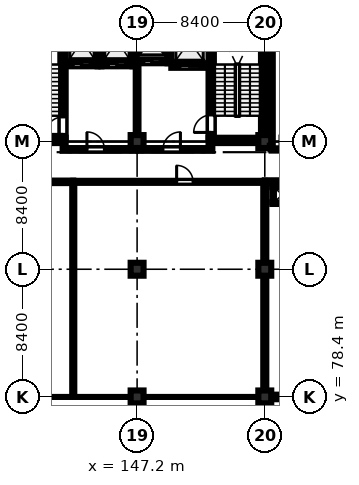
"""IFC4 building model, lengths in metres.
Left out: names, types, materials, properties, quantities, classifications, styles, units other than length and angle.
Written with IfcOpenShell. Run it as: python <this file> out.ifc"""

import sys

from ifc_helpers import new_model, si_unit, direction, frame, frame_2d, origin, origin_2d, place, context, subcontext, project, spatial, rectangle, extrude, element, fill, save


model = new_model("IFC4")
c1 = context("Model", 3, precision=1e-05, world=origin(), true_north=direction((0.0, 1.0)))
c2 = subcontext(c1, "Body", "Model", "MODEL_VIEW")
j1 = project(units=[si_unit("LENGTHUNIT", "METRE"), si_unit("PLANEANGLEUNIT", "RADIAN")], contexts=[c1])
p1 = place(None, origin())
s1 = spatial("IfcSite", under=j1, at=p1, CompositionType="ELEMENT")
p2 = place(p1, origin())
s2 = spatial("IfcBuilding", under=s1, at=p2, CompositionType="ELEMENT")
p3 = place(p2, frame((0.0, 0.0, 27.6)))
s3 = spatial("IfcBuildingStorey", under=s2, at=p3, CompositionType="ELEMENT", Elevation=27.6)
for number, where, z_axis, x_axis in (
    (1, (147.2, 78.4, 0.0), (0.0, 0.0, 1.0), (1.0, 0.0, 0.0)),
    (2, (147.2, 86.8, 0.0), (0.0, 0.0, 1.0), (1.0, 0.0, 0.0)),
    (3, (147.2, 95.2, 0.0), (0.0, 0.0, 1.0), (1.0, 0.0, 0.0)),
    (4, (155.6, 78.4, 0.0), (0.0, 0.0, 1.0), (1.0, 0.0, 0.0)),
    (5, (155.6, 86.8, 0.0), (0.0, 0.0, 1.0), (1.0, 0.0, 0.0)),
    (6, (155.6, 95.2, 0.0), (0.0, 0.0, 1.0), (1.0, 0.0, 0.0)),
):
    element("IfcColumn", number, at=place(p3, frame(where, z_axis=z_axis, x_axis=x_axis)), inside=s3, PredefinedType="COLUMN", context=c2, shape_type="SweptSolid", body=[
        extrude(rectangle(XDim=0.85, YDim=0.85, at=origin_2d()), origin(), (0.0, 0.0, 1.0), 4.02),
    ])
p4 = place(p3, frame((138.7, 95.275, 0.0), z_axis=(0.0, 0.0, 1.0), x_axis=(1.0, 0.0, 0.0)))
e7 = element("IfcWall", 7, at=p4, inside=s3, PredefinedType="SHEAR", context=c2, shape_type="SweptSolid", body=[
    extrude(rectangle(XDim=3.8, YDim=0.35, at=frame_2d((1.9, 0.0))), origin(), (0.0, 0.0, 1.0), 4.02),
])
p5 = place(p3, frame((142.325, 95.45, 0.0), z_axis=(0.0, 0.0, 1.0), x_axis=(0.0, 1.0, 0.0)))
e8 = element("IfcWall", 8, at=p5, inside=s3, PredefinedType="SHEAR", context=c2, shape_type="SweptSolid", body=[
    extrude(rectangle(XDim=7.9, YDim=0.35, at=frame_2d((3.95, 0.0))), origin(), (0.0, 0.0, 1.0), 4.02),
])
p6 = place(p5, frame((0.22, 0.0, 0.0)))
e9 = element("IfcOpeningElement", 9, at=p6, cuts=e8, PredefinedType="OPENING", context=c2, shape_type="SweptSolid", body=[
    extrude(rectangle(XDim=1.15, YDim=2.15, at=frame_2d((0.575, 1.075))), frame((0.0, 0.185, 0.0), z_axis=(0.0, -1.0, 0.0), x_axis=(1.0, 0.0, 0.0)), (0.0, 0.0, 1.0), 0.37),
])
p7 = place(p3, frame((151.9, 95.275, 0.0), z_axis=(0.0, 0.0, 1.0), x_axis=(1.0, 0.0, 0.0)))
e10 = element("IfcWall", 10, at=p7, inside=s3, PredefinedType="SHEAR", context=c2, shape_type="SweptSolid", body=[
    extrude(rectangle(XDim=3.8, YDim=0.35, at=frame_2d((1.9, 0.0))), origin(), (0.0, 0.0, 1.0), 4.02),
])
p8 = place(p3, frame((152.075, 95.45, 0.0), z_axis=(0.0, 0.0, 1.0), x_axis=(0.0, 1.0, 0.0)))
e11 = element("IfcWall", 11, at=p8, inside=s3, PredefinedType="SHEAR", context=c2, shape_type="SweptSolid", body=[
    extrude(rectangle(XDim=7.9, YDim=0.35, at=frame_2d((3.95, 0.0))), origin(), (0.0, 0.0, 1.0), 4.02),
])
p9 = place(p8, frame((0.35, 0.0, 0.0)))
e12 = element("IfcOpeningElement", 12, at=p9, cuts=e11, PredefinedType="OPENING", context=c2, shape_type="SweptSolid", body=[
    extrude(rectangle(XDim=1.15, YDim=2.15, at=frame_2d((0.575, 1.075))), frame((0.0, 0.185, 0.0), z_axis=(0.0, -1.0, 0.0), x_axis=(1.0, 0.0, 0.0)), (0.0, 0.0, 1.0), 0.37),
])
p10 = place(p3, frame((155.525, 95.45, 0.0), z_axis=(0.0, 0.0, 1.0), x_axis=(0.0, 1.0, 0.0)))
e13 = element("IfcWall", 13, at=p10, inside=s3, PredefinedType="SHEAR", context=c2, shape_type="SweptSolid", body=[
    extrude(rectangle(XDim=7.9, YDim=0.35, at=frame_2d((3.95, 0.0))), origin(), (0.0, 0.0, 1.0), 4.02),
])
p11 = place(p3, frame((142.5, 100.275, 0.0), z_axis=(0.0, 0.0, 1.0), x_axis=(1.0, 0.0, 0.0)))
e14 = element("IfcWall", 14, at=p11, inside=s3, PredefinedType="SHEAR", context=c2, shape_type="SweptSolid", body=[
    extrude(rectangle(XDim=2.1, YDim=0.25, at=frame_2d((1.05, 0.0))), origin(), (0.0, 0.0, 1.0), 4.02),
])
p12 = place(p11, frame((0.5, 0.0, 0.0)))
e15 = element("IfcOpeningElement", 15, at=p12, cuts=e14, PredefinedType="OPENING", context=c2, shape_type="SweptSolid", body=[
    extrude(rectangle(XDim=1.1, YDim=2.15, at=frame_2d((0.55, 1.075))), frame((0.0, 0.135, 0.0), z_axis=(0.0, -1.0, 0.0), x_axis=(1.0, 0.0, 0.0)), (0.0, 0.0, 1.0), 0.27),
])
p13 = place(p3, frame((144.725, 100.15, 0.0), z_axis=(0.0, 0.0, 1.0), x_axis=(0.0, 1.0, 0.0)))
e16 = element("IfcWall", 16, at=p13, inside=s3, PredefinedType="SHEAR", context=c2, shape_type="SweptSolid", body=[
    extrude(rectangle(XDim=3.4, YDim=0.25, at=frame_2d((1.7, 0.0))), origin(), (0.0, 0.0, 1.0), 4.02),
])
p14 = place(p3, frame((144.85, 100.275, 0.0), z_axis=(0.0, 0.0, 1.0), x_axis=(1.0, 0.0, 0.0)))
e17 = element("IfcWall", 17, at=p14, inside=s3, PredefinedType="SHEAR", context=c2, shape_type="SweptSolid", body=[
    extrude(rectangle(XDim=2.05, YDim=0.25, at=frame_2d((1.025, 0.0))), origin(), (0.0, 0.0, 1.0), 4.02),
])
p15 = place(p14, frame((0.465, 0.0, 0.0)))
e18 = element("IfcOpeningElement", 18, at=p15, cuts=e17, PredefinedType="OPENING", context=c2, shape_type="SweptSolid", body=[
    extrude(rectangle(XDim=1.12, YDim=2.15, at=frame_2d((0.56, 1.075))), frame((0.0, 0.135, 0.0), z_axis=(0.0, -1.0, 0.0), x_axis=(1.0, 0.0, 0.0)), (0.0, 0.0, 1.0), 0.27),
])
p16 = place(p3, frame((147.025, 100.15, 0.0), z_axis=(0.0, 0.0, 1.0), x_axis=(0.0, 1.0, 0.0)))
e19 = element("IfcWall", 19, at=p16, inside=s3, PredefinedType="SHEAR", context=c2, shape_type="SweptSolid", body=[
    extrude(rectangle(XDim=3.4, YDim=0.25, at=frame_2d((1.7, 0.0))), origin(), (0.0, 0.0, 1.0), 4.02),
])
p17 = place(p3, frame((147.15, 100.475, 0.0), z_axis=(0.0, 0.0, 1.0), x_axis=(1.0, 0.0, 0.0)))
e20 = element("IfcWall", 20, at=p17, inside=s3, PredefinedType="SHEAR", context=c2, shape_type="SweptSolid", body=[
    extrude(rectangle(XDim=2.05, YDim=0.25, at=frame_2d((1.025, 0.0))), origin(), (0.0, 0.0, 1.0), 4.02),
])
p18 = place(p17, frame((0.495, 0.0, 0.0)))
e21 = element("IfcOpeningElement", 21, at=p18, cuts=e20, PredefinedType="OPENING", context=c2, shape_type="SweptSolid", body=[
    extrude(rectangle(XDim=1.06, YDim=2.15, at=frame_2d((0.53, 1.075))), frame((0.0, 0.135, 0.0), z_axis=(0.0, -1.0, 0.0), x_axis=(1.0, 0.0, 0.0)), (0.0, 0.0, 1.0), 0.27),
])
p19 = place(p3, frame((149.325, 100.35, 0.0), z_axis=(0.0, 0.0, 1.0), x_axis=(0.0, 1.0, 0.0)))
e22 = element("IfcWall", 22, at=p19, inside=s3, PredefinedType="SHEAR", context=c2, shape_type="SweptSolid", body=[
    extrude(rectangle(XDim=3.2, YDim=0.25, at=frame_2d((1.6, 0.0))), origin(), (0.0, 0.0, 1.0), 4.02),
])
p20 = place(p3, frame((149.45, 100.175, 0.0), z_axis=(0.0, 0.0, 1.0), x_axis=(1.0, 0.0, 0.0)))
e23 = element("IfcWall", 23, at=p20, inside=s3, PredefinedType="SHEAR", context=c2, shape_type="SweptSolid", body=[
    extrude(rectangle(XDim=2.45, YDim=0.25, at=frame_2d((1.225, 0.0))), origin(), (0.0, 0.0, 1.0), 4.02),
])
p21 = place(p20, frame((0.575, 0.0, 0.0)))
e24 = element("IfcOpeningElement", 24, at=p21, cuts=e23, PredefinedType="OPENING", context=c2, shape_type="SweptSolid", body=[
    extrude(rectangle(XDim=1.3, YDim=2.25, at=frame_2d((0.65, 1.125))), frame((0.0, 0.135, 0.0), z_axis=(0.0, -1.0, 0.0), x_axis=(1.0, 0.0, 0.0)), (0.0, 0.0, 1.0), 0.27),
])
p22 = place(p3, frame((163.025, 78.4, 0.0), z_axis=(0.0, 0.0, 1.0), x_axis=(-1.0, 0.0, 0.0)))
e25 = element("IfcWall", 25, at=p22, inside=s3, PredefinedType="STANDARD", context=c2, shape_type="SweptSolid", body=[
    extrude(rectangle(XDim=7.0, YDim=0.3, at=frame_2d((3.5, 0.0))), origin(), (0.0, 0.0, 1.0), 3.32),
])
p23 = place(p22, frame((1.15, 0.0, 0.95)))
e26 = element("IfcOpeningElement", 26, at=p23, cuts=e25, PredefinedType="OPENING", context=c2, shape_type="SweptSolid", body=[
    extrude(rectangle(XDim=1.85, YDim=2.05, at=frame_2d((0.925, 1.025))), frame((0.0, 0.16, 0.0), z_axis=(0.0, -1.0, 0.0), x_axis=(1.0, 0.0, 0.0)), (0.0, 0.0, 1.0), 0.32),
])
p24 = place(p3, frame((142.3, 94.68, 0.0), z_axis=(0.0, 0.0, 1.0), x_axis=(1.0, 0.0, 0.0)))
e27 = element("IfcWall", 27, at=p24, inside=s3, PredefinedType="STANDARD", context=c2, shape_type="SweptSolid", body=[
    extrude(rectangle(XDim=4.8, YDim=0.18, at=frame_2d((2.4, 0.0))), origin(), (0.0, 0.0, 1.0), 4.02),
])
p25 = place(p24, frame((1.6, 0.0, 0.0)))
e28 = element("IfcOpeningElement", 28, at=p25, cuts=e27, PredefinedType="OPENING", context=c2, shape_type="SweptSolid", body=[
    extrude(rectangle(XDim=1.15, YDim=2.15, at=frame_2d((0.575, 1.075))), frame((0.0, 0.1, 0.0), z_axis=(0.0, -1.0, 0.0), x_axis=(1.0, 0.0, 0.0)), (0.0, 0.0, 1.0), 0.2),
])
p26 = place(p3, frame((147.3, 94.68, 0.0), z_axis=(0.0, 0.0, 1.0), x_axis=(1.0, 0.0, 0.0)))
e29 = element("IfcWall", 29, at=p26, inside=s3, PredefinedType="STANDARD", context=c2, shape_type="SweptSolid", body=[
    extrude(rectangle(XDim=4.85, YDim=0.18, at=frame_2d((2.425, 0.0))), origin(), (0.0, 0.0, 1.0), 4.02),
])
p27 = place(p26, frame((1.6, 0.0, 0.0)))
e30 = element("IfcOpeningElement", 30, at=p27, cuts=e29, PredefinedType="OPENING", context=c2, shape_type="SweptSolid", body=[
    extrude(rectangle(XDim=1.15, YDim=2.15, at=frame_2d((0.575, 1.075))), frame((0.0, 0.1, 0.0), z_axis=(0.0, -1.0, 0.0), x_axis=(1.0, 0.0, 0.0)), (0.0, 0.0, 1.0), 0.2),
])
p28 = place(p3, frame((147.2, 95.75, 0.0), z_axis=(0.0, 0.0, 1.0), x_axis=(0.0, 1.0, 0.0)))
e31 = element("IfcWall", 31, at=p28, inside=s3, PredefinedType="STANDARD", context=c2, shape_type="SweptSolid", body=[
    extrude(rectangle(XDim=4.5, YDim=0.18, at=frame_2d((2.25, 0.0))), origin(), (0.0, 0.0, 1.0), 3.32),
])
p29 = place(p3, frame((156.05, 94.68, 0.0), z_axis=(0.0, 0.0, 1.0), x_axis=(1.0, 0.0, 0.0)))
e32 = element("IfcWall", 32, at=p29, inside=s3, PredefinedType="PARTITIONING", context=c2, shape_type="SweptSolid", body=[
    extrude(rectangle(XDim=7.15, YDim=0.15, at=frame_2d((3.575, 0.0))), origin(), (0.0, 0.0, 1.0), 4.02),
])
p30 = place(p29, frame((0.55, 0.0, 0.0)))
e33 = element("IfcOpeningElement", 33, at=p30, cuts=e32, PredefinedType="OPENING", context=c2, shape_type="SweptSolid", body=[
    extrude(rectangle(XDim=0.98, YDim=2.12, at=frame_2d((0.49, 1.06))), frame((0.0, 0.085, 0.0), z_axis=(0.0, -1.0, 0.0), x_axis=(1.0, 0.0, 0.0)), (0.0, 0.0, 1.0), 0.17),
])
p31 = place(p3, frame((156.05, 94.68, 0.0), z_axis=(0.0, 0.0, 1.0), x_axis=(0.0, 1.0, 0.0)))
e34 = element("IfcWall", 34, at=p31, inside=s3, PredefinedType="PARTITIONING", context=c2, shape_type="SweptSolid", body=[
    extrude(rectangle(XDim=8.57, YDim=0.15, at=frame_2d((4.285, 0.0))), origin(), (0.0, 0.0, 1.0), 4.02),
])
p32 = place(p3, frame((130.55, 92.55, 0.0), z_axis=(0.0, 0.0, 1.0), x_axis=(1.0, 0.0, 0.0)))
e35 = element("IfcWall", 35, at=p32, inside=s3, PredefinedType="PARTITIONING", context=c2, shape_type="SweptSolid", body=[
    extrude(rectangle(XDim=12.45, YDim=0.165, at=frame_2d((6.225, 0.0))), origin(), (0.0, 0.0, 1.0), 4.02),
])
p33 = place(p32, frame((3.65, 0.0, 0.0)))
e36 = element("IfcOpeningElement", 36, at=p33, cuts=e35, PredefinedType="OPENING", context=c2, shape_type="SweptSolid", body=[
    extrude(rectangle(XDim=1.52, YDim=2.22, at=frame_2d((0.76, 1.11))), frame((0.0, 0.093, 0.0), z_axis=(0.0, -1.0, 0.0), x_axis=(1.0, 0.0, 0.0)), (0.0, 0.0, 1.0), 0.185),
])
p34 = place(p3, frame((143.0, 92.55, 0.0), z_axis=(0.0, 0.0, 1.0), x_axis=(1.0, 0.0, 0.0)))
e37 = element("IfcWall", 37, at=p34, inside=s3, PredefinedType="PARTITIONING", context=c2, shape_type="SweptSolid", body=[
    extrude(rectangle(XDim=12.6, YDim=0.135, at=frame_2d((6.3, 0.0))), origin(), (0.0, 0.0, 1.0), 4.02),
])
p35 = place(p34, frame((6.8, 0.0, 0.0)))
e38 = element("IfcOpeningElement", 38, at=p35, cuts=e37, PredefinedType="OPENING", context=c2, shape_type="SweptSolid", body=[
    extrude(rectangle(XDim=1.08, YDim=2.15, at=frame_2d((0.54, 1.075))), frame((0.0, 0.077, 0.0), z_axis=(0.0, -1.0, 0.0), x_axis=(1.0, 0.0, 0.0)), (0.0, 0.0, 1.0), 0.155),
])
p36 = place(p3, frame((143.0, 78.55, 0.0), z_axis=(0.0, 0.0, 1.0), x_axis=(0.0, 1.0, 0.0)))
e39 = element("IfcWall", 39, at=p36, inside=s3, PredefinedType="PARTITIONING", context=c2, shape_type="SweptSolid", body=[
    extrude(rectangle(XDim=14.0, YDim=0.135, at=frame_2d((7.0, 0.0))), origin(), (0.0, 0.0, 1.0), 3.52),
])
p37 = place(p3, frame((155.6, 92.55, 0.0), z_axis=(0.0, 0.0, 1.0), x_axis=(1.0, 0.0, 0.0)))
e40 = element("IfcWall", 40, at=p37, inside=s3, PredefinedType="SOLIDWALL", context=c2, shape_type="SweptSolid", body=[
    extrude(rectangle(XDim=7.75, YDim=0.2, at=frame_2d((3.875, 0.0))), origin(), (0.0, 0.0, 1.0), 4.02),
])
p38 = place(p37, frame((3.4, 0.0, 0.0)))
e41 = element("IfcOpeningElement", 41, at=p38, cuts=e40, PredefinedType="OPENING", context=c2, shape_type="SweptSolid", body=[
    extrude(rectangle(XDim=1.5, YDim=2.2, at=frame_2d((0.75, 1.1))), frame((0.0, 0.11, 0.0), z_axis=(0.0, -1.0, 0.0), x_axis=(1.0, 0.0, 0.0)), (0.0, 0.0, 1.0), 0.22),
])
p39 = place(p3, frame((155.6, 78.55, 0.0), z_axis=(0.0, 0.0, 1.0), x_axis=(0.0, 1.0, 0.0)))
e42 = element("IfcWall", 42, at=p39, inside=s3, PredefinedType="SOLIDWALL", context=c2, shape_type="SweptSolid", body=[
    extrude(rectangle(XDim=14.0, YDim=0.2, at=frame_2d((7.0, 0.0))), origin(), (0.0, 0.0, 1.0), 3.32),
])
for number, where, z_axis, x_axis in (
    (43, (156.095, 91.147, 0.0), (0.0, 0.0, 1.0), (1.0, 0.0, 0.0)),
    (44, (156.095, 92.252, 0.0), (0.0, 0.0, 1.0), (1.0, 0.0, 0.0)),
):
    element("IfcWall", number, at=place(p3, frame(where, z_axis=z_axis, x_axis=x_axis)), inside=s3, PredefinedType="PARTITIONING", context=c2, shape_type="SweptSolid", body=[
        extrude(rectangle(XDim=1.31, YDim=0.105, at=frame_2d((0.655, 0.0))), origin(), (0.0, 0.0, 1.0), 4.02),
    ])
p40 = place(p3, frame((156.147, 91.2, 0.0), z_axis=(0.0, 0.0, 1.0), x_axis=(0.0, 1.0, 0.0)))
e45 = element("IfcWall", 45, at=p40, inside=s3, PredefinedType="PARTITIONING", context=c2, shape_type="SweptSolid", body=[
    extrude(rectangle(XDim=1.0, YDim=0.105, at=frame_2d((0.5, 0.0))), origin(), (0.0, 0.0, 1.0), 4.02),
])
p41 = place(p25, origin())
e46 = element("IfcDoor", 46, at=p41, inside=s3, OperationType="SINGLE_SWING_LEFT", PredefinedType="DOOR", context=c2, shape_type="SweptSolid", body=[
    extrude(rectangle(XDim=1.15, YDim=2.15, at=frame_2d((0.575, 1.075))), frame((0.0, 0.025, 0.0), z_axis=(0.0, -1.0, 0.0), x_axis=(1.0, 0.0, 0.0)), (0.0, 0.0, 1.0), 0.05),
])
fill(e28, e46)
p42 = place(p27, origin())
e47 = element("IfcDoor", 47, at=p42, inside=s3, OperationType="SINGLE_SWING_RIGHT", PredefinedType="DOOR", context=c2, shape_type="SweptSolid", body=[
    extrude(rectangle(XDim=1.15, YDim=2.15, at=frame_2d((0.575, 1.075))), frame((0.0, 0.025, 0.0), z_axis=(0.0, -1.0, 0.0), x_axis=(1.0, 0.0, 0.0)), (0.0, 0.0, 1.0), 0.05),
])
fill(e30, e47)
p43 = place(p35, origin())
e48 = element("IfcDoor", 48, at=p43, inside=s3, OperationType="SINGLE_SWING_LEFT", PredefinedType="DOOR", context=c2, shape_type="SweptSolid", body=[
    extrude(rectangle(XDim=1.08, YDim=2.15, at=frame_2d((0.54, 1.075))), frame((0.0, 0.025, 0.0), z_axis=(0.0, -1.0, 0.0), x_axis=(1.0, 0.0, 0.0)), (0.0, 0.0, 1.0), 0.05),
])
fill(e38, e48)
p44 = place(p6, origin())
e49 = element("IfcDoor", 49, at=p44, inside=s3, OperationType="SINGLE_SWING_LEFT", PredefinedType="DOOR", context=c2, shape_type="SweptSolid", body=[
    extrude(rectangle(XDim=1.15, YDim=2.15, at=frame_2d((0.575, 1.075))), frame((0.0, 0.025, 0.0), z_axis=(0.0, -1.0, 0.0), x_axis=(1.0, 0.0, 0.0)), (0.0, 0.0, 1.0), 0.05),
])
fill(e9, e49)
p45 = place(p9, origin())
e50 = element("IfcDoor", 50, at=p45, inside=s3, OperationType="SINGLE_SWING_LEFT", PredefinedType="DOOR", context=c2, shape_type="SweptSolid", body=[
    extrude(rectangle(XDim=1.15, YDim=2.15, at=frame_2d((0.575, 1.075))), frame((0.0, 0.025, 0.0), z_axis=(0.0, -1.0, 0.0), x_axis=(1.0, 0.0, 0.0)), (0.0, 0.0, 1.0), 0.05),
])
fill(e12, e50)
p46 = place(p12, origin())
e51 = element("IfcDoor", 51, at=p46, inside=s3, OperationType="SLIDING_TO_LEFT", PredefinedType="DOOR", context=c2, shape_type="SweptSolid", body=[
    extrude(rectangle(XDim=1.1, YDim=2.15, at=frame_2d((0.55, 1.075))), frame((0.0, 0.025, 0.0), z_axis=(0.0, -1.0, 0.0), x_axis=(1.0, 0.0, 0.0)), (0.0, 0.0, 1.0), 0.05),
])
fill(e15, e51)
p47 = place(p15, origin())
e52 = element("IfcDoor", 52, at=p47, inside=s3, OperationType="SLIDING_TO_LEFT", PredefinedType="DOOR", context=c2, shape_type="SweptSolid", body=[
    extrude(rectangle(XDim=1.12, YDim=2.15, at=frame_2d((0.56, 1.075))), frame((0.0, 0.025, 0.0), z_axis=(0.0, -1.0, 0.0), x_axis=(1.0, 0.0, 0.0)), (0.0, 0.0, 1.0), 0.05),
])
fill(e18, e52)
p48 = place(p18, origin())
e53 = element("IfcDoor", 53, at=p48, inside=s3, OperationType="SLIDING_TO_LEFT", PredefinedType="DOOR", context=c2, shape_type="SweptSolid", body=[
    extrude(rectangle(XDim=1.06, YDim=2.15, at=frame_2d((0.53, 1.075))), frame((0.0, 0.025, 0.0), z_axis=(0.0, -1.0, 0.0), x_axis=(1.0, 0.0, 0.0)), (0.0, 0.0, 1.0), 0.05),
])
fill(e21, e53)
p49 = place(p21, origin())
e54 = element("IfcDoor", 54, at=p49, inside=s3, OperationType="SLIDING_TO_LEFT", PredefinedType="DOOR", context=c2, shape_type="SweptSolid", body=[
    extrude(rectangle(XDim=1.3, YDim=2.25, at=frame_2d((0.65, 1.125))), frame((0.0, 0.025, 0.0), z_axis=(0.0, -1.0, 0.0), x_axis=(1.0, 0.0, 0.0)), (0.0, 0.0, 1.0), 0.05),
])
fill(e24, e54)
save(model, sys.argv[1])
